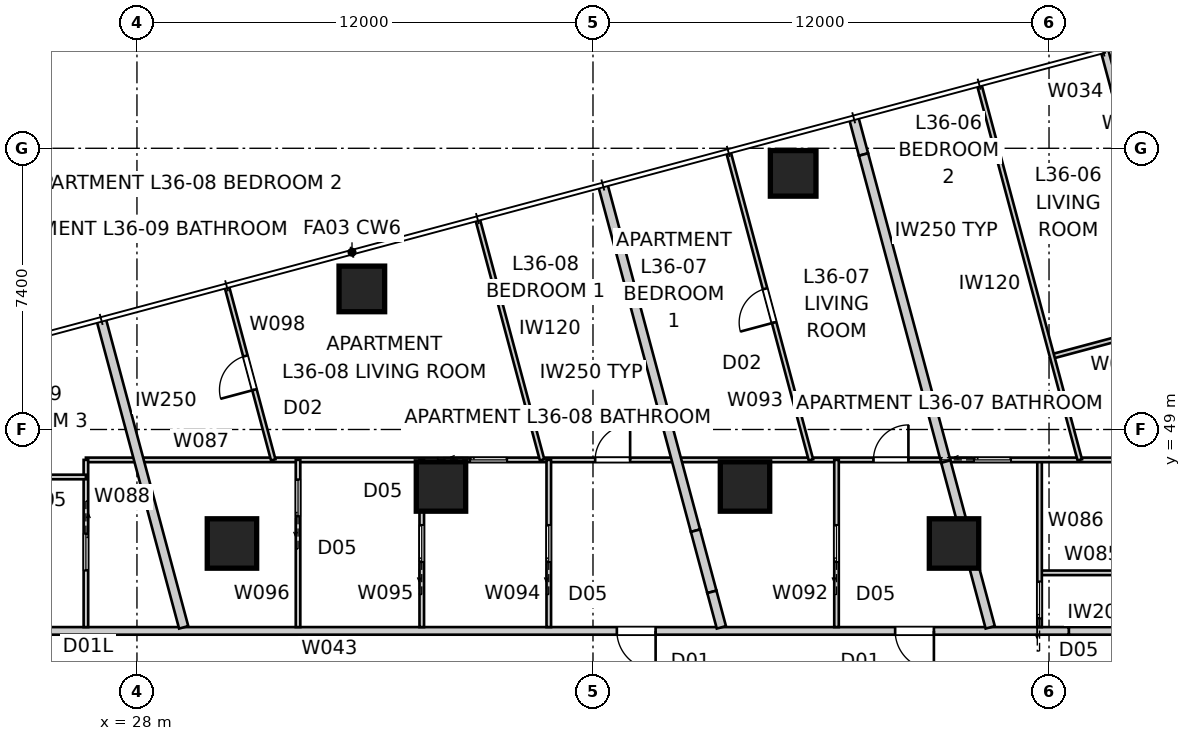
"""IFC4 building model, lengths in metres.
Left out: names, types, materials, properties, quantities, classifications, styles, units other than length and angle.
Written with IfcOpenShell. Run it as: python <this file> out.ifc"""

import sys

from ifc_helpers import new_model, si_unit, direction, frame, frame_2d, origin, origin_2d, place, context, subcontext, project, spatial, rectangle, extrude, element, fill, save


model = new_model("IFC4")
c1 = context("Model", 3, precision=1e-05, world=origin(), true_north=direction((0.0, 1.0)))
c2 = subcontext(c1, "Body", "Model", "MODEL_VIEW")
j1 = project(units=[si_unit("LENGTHUNIT", "METRE"), si_unit("PLANEANGLEUNIT", "RADIAN")], contexts=[c1])
p1 = place(None, origin())
s1 = spatial("IfcSite", under=j1, at=p1, CompositionType="ELEMENT")
p2 = place(p1, origin())
s2 = spatial("IfcBuilding", under=s1, at=p2, CompositionType="ELEMENT")
p3 = place(p2, frame((0.0, 0.0, 132.0)))
s3 = spatial("IfcBuildingStorey", under=s2, at=p3, CompositionType="ELEMENT", Elevation=132.0)
for number, where, z_axis, x_axis in (
    (1, (45.267, 55.74, 0.0), (0.0, 0.0, 1.0), (1.0, 0.0, 0.0)),
    (2, (33.918, 52.699, 0.0), (0.0, 0.0, 1.0), (1.0, 0.0, 0.0)),
):
    element("IfcColumn", number, at=place(p3, frame(where, z_axis=z_axis, x_axis=x_axis)), inside=s3, PredefinedType="COLUMN", context=c2, shape_type="SweptSolid", body=[
        extrude(rectangle(XDim=1.2, YDim=1.2, at=origin_2d()), origin(), (0.0, 0.0, 1.0), 3.4),
    ])
for number, where, z_axis, x_axis in (
    (3, (49.5, 46.0, 0.0), (0.0, 0.0, 1.0), (1.0, 0.0, 0.0)),
    (4, (44.0, 47.5, 0.0), (0.0, 0.0, 1.0), (1.0, 0.0, 0.0)),
    (5, (36.0, 47.5, 0.0), (0.0, 0.0, 1.0), (1.0, 0.0, 0.0)),
    (6, (30.5, 46.0, 0.0), (0.0, 0.0, 1.0), (1.0, 0.0, 0.0)),
):
    element("IfcColumn", number, at=place(p3, frame(where, z_axis=z_axis, x_axis=x_axis)), inside=s3, PredefinedType="COLUMN", context=c2, shape_type="SweptSolid", body=[
        extrude(rectangle(XDim=1.3, YDim=1.3, at=origin_2d()), origin(), (0.0, 0.0, 1.0), 3.4),
    ])
p4 = place(p3, frame((54.496, 55.107, 0.0), z_axis=(0.0, 0.0, 1.0), x_axis=(-0.258786931944, 0.965934430412, 0.0)))
e7 = element("IfcWall", 7, at=p4, inside=s3, PredefinedType="SOLIDWALL", context=c2, shape_type="SweptSolid", body=[
    extrude(rectangle(XDim=4.0, YDim=0.2, at=frame_2d((2.0, 0.0))), origin(), (0.0, 0.0, 1.0), 3.25),
])
p5 = place(p4, frame((1.0, 0.0, 0.45)))
e8 = element("IfcOpeningElement", 8, at=p5, cuts=e7, PredefinedType="OPENING", context=c2, shape_type="SweptSolid", body=[
    extrude(rectangle(XDim=2.0, YDim=1.8, at=frame_2d((1.0, 0.9))), frame((0.0, 0.11, 0.0), z_axis=(0.0, -1.0, 0.0), x_axis=(1.0, 0.0, 0.0)), (0.0, 0.0, 1.0), 0.22),
])
p6 = place(p3, frame((54.074, 43.7, 0.0), z_axis=(0.0, 0.0, 1.0), x_axis=(-1.0, 0.0, 0.0)))
e9 = element("IfcWall", 9, at=p6, inside=s3, PredefinedType="PARTITIONING", context=c2, shape_type="SweptSolid", body=[
    extrude(rectangle(XDim=1.554, YDim=0.2, at=frame_2d((0.777, 0.0))), origin(), (0.0, 0.0, 1.0), 2.721),
])
p7 = place(p3, frame((52.52, 43.7, 0.0), z_axis=(0.0, 0.0, 1.0), x_axis=(-1.0, 0.0, 0.0)))
e10 = element("IfcWall", 10, at=p7, inside=s3, PredefinedType="PARTITIONING", context=c2, shape_type="SweptSolid", body=[
    extrude(rectangle(XDim=27.02, YDim=0.2, at=frame_2d((13.51, 0.0))), origin(), (0.0, 0.0, 1.0), 3.25),
])
p8 = place(p7, frame((10.872, 0.0, 0.0)))
e11 = element("IfcOpeningElement", 11, at=p8, cuts=e10, PredefinedType="OPENING", context=c2, shape_type="SweptSolid", body=[
    extrude(rectangle(XDim=1.02, YDim=2.34, at=frame_2d((0.51, 1.17))), frame((0.0, 0.11, 0.0), z_axis=(0.0, -1.0, 0.0), x_axis=(1.0, 0.0, 0.0)), (0.0, 0.0, 1.0), 0.22),
])
p9 = place(p7, frame((3.549, 0.0, 0.0)))
e12 = element("IfcOpeningElement", 12, at=p9, cuts=e10, PredefinedType="OPENING", context=c2, shape_type="SweptSolid", body=[
    extrude(rectangle(XDim=1.02, YDim=2.34, at=frame_2d((0.51, 1.17))), frame((0.0, 0.11, 0.0), z_axis=(0.0, -1.0, 0.0), x_axis=(1.0, 0.0, 0.0)), (0.0, 0.0, 1.0), 0.22),
])
p10 = place(p3, frame((40.26, 55.434, 0.0), z_axis=(0.0, 0.0, 1.0), x_axis=(0.258812973453, -0.965927453162, 0.0)))
e13 = element("IfcWall", 13, at=p10, inside=s3, PredefinedType="PARTITIONING", context=c2, shape_type="SweptSolid", body=[
    extrude(rectangle(XDim=9.417, YDim=0.25, at=frame_2d((4.708, 0.0))), origin(), (0.0, 0.0, 1.0), 3.25),
])
p11 = place(p3, frame((42.697, 46.338, 0.0), z_axis=(0.0, 0.0, 1.0), x_axis=(0.258765365057, -0.965940208215, 0.0)))
e14 = element("IfcWall", 14, at=p11, inside=s3, PredefinedType="PARTITIONING", context=c2, shape_type="SweptSolid", body=[
    extrude(rectangle(XDim=1.667, YDim=0.25, at=frame_2d((0.833, 0.0))), origin(), (0.0, 0.0, 1.0), 2.796),
])
p12 = place(p3, frame((43.128, 44.727, 0.0), z_axis=(0.0, 0.0, 1.0), x_axis=(0.258904424314, -0.965902944954, 0.0)))
e15 = element("IfcWall", 15, at=p12, inside=s3, PredefinedType="PARTITIONING", context=c2, shape_type="SweptSolid", body=[
    extrude(rectangle(XDim=0.967, YDim=0.25, at=frame_2d((0.483, 0.0))), origin(), (0.0, 0.0, 1.0), 3.25),
])
p13 = place(p3, frame((27.058, 51.896, 0.0), z_axis=(0.0, 0.0, 1.0), x_axis=(0.258819975199, -0.96592557707, 0.0)))
e16 = element("IfcWall", 16, at=p13, inside=s3, PredefinedType="PARTITIONING", context=c2, shape_type="SweptSolid", body=[
    extrude(rectangle(XDim=8.389, YDim=0.25, at=frame_2d((4.194, 0.0))), origin(), (0.0, 0.0, 1.0), 3.25),
])
p14 = place(p3, frame((46.86, 57.202, 0.0), z_axis=(0.0, 0.0, 1.0), x_axis=(0.258817449225, -0.965926253902, 0.0)))
e17 = element("IfcWall", 17, at=p14, inside=s3, PredefinedType="PARTITIONING", context=c2, shape_type="SweptSolid", body=[
    extrude(rectangle(XDim=1.0, YDim=0.25, at=frame_2d((0.5, 0.0))), origin(), (0.0, 0.0, 1.0), 3.25),
])
p15 = place(p3, frame((47.119, 56.237, 0.0), z_axis=(0.0, 0.0, 1.0), x_axis=(0.258823120582, -0.965924734258, 0.0)))
e18 = element("IfcWall", 18, at=p15, inside=s3, PredefinedType="PARTITIONING", context=c2, shape_type="SweptSolid", body=[
    extrude(rectangle(XDim=8.366, YDim=0.25, at=frame_2d((4.183, 0.0))), origin(), (0.0, 0.0, 1.0), 2.721),
])
p16 = place(p3, frame((49.284, 48.156, 0.0), z_axis=(0.0, 0.0, 1.0), x_axis=(0.258846876801, -0.965918368378, 0.0)))
e19 = element("IfcWall", 19, at=p16, inside=s3, PredefinedType="PARTITIONING", context=c2, shape_type="SweptSolid", body=[
    extrude(rectangle(XDim=4.516, YDim=0.25, at=frame_2d((2.258, 0.0))), origin(), (0.0, 0.0, 1.0), 3.25),
])
p17 = place(p3, frame((51.751, 45.228, 0.0), z_axis=(0.0, 0.0, 1.0), x_axis=(1.0, 0.0, 0.0)))
e20 = element("IfcWall", 20, at=p17, inside=s3, PredefinedType="PARTITIONING", context=c2, shape_type="SweptSolid", body=[
    extrude(rectangle(XDim=6.449, YDim=0.12, at=frame_2d((3.225, 0.0))), origin(), (0.0, 0.0, 1.0), 3.25),
])
p18 = place(p17, frame((2.764, 0.0, 0.0)))
e21 = element("IfcOpeningElement", 21, at=p18, cuts=e20, PredefinedType="OPENING", context=c2, shape_type="SweptSolid", body=[
    extrude(rectangle(XDim=0.92, YDim=2.34, at=frame_2d((0.46, 1.17))), frame((0.0, 0.07, 0.0), z_axis=(0.0, -1.0, 0.0), x_axis=(1.0, 0.0, 0.0)), (0.0, 0.0, 1.0), 0.14),
])
p19 = place(p3, frame((51.751, 43.8, 0.0), z_axis=(0.0, 0.0, 1.0), x_axis=(0.0, 1.0, 0.0)))
e22 = element("IfcWall", 22, at=p19, inside=s3, PredefinedType="PARTITIONING", context=c2, shape_type="SweptSolid", body=[
    extrude(rectangle(XDim=4.4, YDim=0.12, at=frame_2d((2.2, 0.0))), origin(), (0.0, 0.0, 1.0), 3.25),
])
p20 = place(p19, frame((0.234, 0.0, 0.0)))
e23 = element("IfcOpeningElement", 23, at=p20, cuts=e22, PredefinedType="OPENING", context=c2, shape_type="SweptSolid", body=[
    extrude(rectangle(XDim=0.96, YDim=2.1, at=frame_2d((0.48, 1.05))), frame((0.0, 0.07, 0.0), z_axis=(0.0, -1.0, 0.0), x_axis=(1.0, 0.0, 0.0)), (0.0, 0.0, 1.0), 0.14),
])
p21 = place(p3, frame((26.657, 48.2, 0.0), z_axis=(0.0, 0.0, 1.0), x_axis=(1.0, 0.0, 0.0)))
e24 = element("IfcWall", 24, at=p21, inside=s3, PredefinedType="PARTITIONING", context=c2, shape_type="SweptSolid", body=[
    extrude(rectangle(XDim=31.543, YDim=0.12, at=frame_2d((15.771, 0.0))), origin(), (0.0, 0.0, 1.0), 2.637),
])
p22 = place(p21, frame((13.4, 0.0, 0.0)))
e25 = element("IfcOpeningElement", 25, at=p22, cuts=e24, PredefinedType="OPENING", context=c2, shape_type="SweptSolid", body=[
    extrude(rectangle(XDim=0.92, YDim=2.34, at=frame_2d((0.46, 1.17))), frame((0.0, 0.07, 0.0), z_axis=(0.0, -1.0, 0.0), x_axis=(1.0, 0.0, 0.0)), (0.0, 0.0, 1.0), 0.14),
])
p23 = place(p21, frame((20.723, 0.0, 0.0)))
e26 = element("IfcOpeningElement", 26, at=p23, cuts=e24, PredefinedType="OPENING", context=c2, shape_type="SweptSolid", body=[
    extrude(rectangle(XDim=0.92, YDim=2.34, at=frame_2d((0.46, 1.17))), frame((0.0, 0.07, 0.0), z_axis=(0.0, -1.0, 0.0), x_axis=(1.0, 0.0, 0.0)), (0.0, 0.0, 1.0), 0.14),
])
p24 = place(p21, frame((10.117, 0.0, 0.0)))
e27 = element("IfcOpeningElement", 27, at=p24, cuts=e24, PredefinedType="OPENING", context=c2, shape_type="SweptSolid", body=[
    extrude(rectangle(XDim=0.96, YDim=2.1, at=frame_2d((0.48, 1.05))), frame((0.0, 0.07, 0.0), z_axis=(0.0, -1.0, 0.0), x_axis=(1.0, 0.0, 0.0)), (0.0, 0.0, 1.0), 0.14),
])
p25 = place(p21, frame((28.362, 0.0, 0.0)))
e28 = element("IfcOpeningElement", 28, at=p25, cuts=e24, PredefinedType="OPENING", context=c2, shape_type="SweptSolid", body=[
    extrude(rectangle(XDim=0.92, YDim=2.34, at=frame_2d((0.46, 1.17))), frame((0.0, 0.07, 0.0), z_axis=(0.0, -1.0, 0.0), x_axis=(1.0, 0.0, 0.0)), (0.0, 0.0, 1.0), 0.14),
])
p26 = place(p21, frame((23.375, 0.0, 0.0)))
e29 = element("IfcOpeningElement", 29, at=p26, cuts=e24, PredefinedType="OPENING", context=c2, shape_type="SweptSolid", body=[
    extrude(rectangle(XDim=0.96, YDim=2.1, at=frame_2d((0.48, 1.05))), frame((0.0, 0.07, 0.0), z_axis=(0.0, -1.0, 0.0), x_axis=(1.0, 0.0, 0.0)), (0.0, 0.0, 1.0), 0.14),
])
p27 = place(p3, frame((59.205, 52.832, 0.0), z_axis=(0.0, 0.0, 1.0), x_axis=(-0.965926630377, -0.258816044185, 0.0)))
e30 = element("IfcWall", 30, at=p27, inside=s3, PredefinedType="PARTITIONING", context=c2, shape_type="SweptSolid", body=[
    extrude(rectangle(XDim=7.377, YDim=0.12, at=frame_2d((3.688, 0.0))), origin(), (0.0, 0.0, 1.0), 3.25),
])
p28 = place(p27, frame((3.208, 0.0, 0.0)))
e31 = element("IfcOpeningElement", 31, at=p28, cuts=e30, PredefinedType="OPENING", context=c2, shape_type="SweptSolid", body=[
    extrude(rectangle(XDim=0.92, YDim=2.34, at=frame_2d((0.46, 1.17))), frame((0.0, 0.07, 0.0), z_axis=(0.0, -1.0, 0.0), x_axis=(1.0, 0.0, 0.0)), (0.0, 0.0, 1.0), 0.14),
])
p29 = place(p3, frame((52.809, 48.2, 0.0), z_axis=(0.0, 0.0, 1.0), x_axis=(-0.258829444594, 0.965923039694, 0.0)))
e32 = element("IfcWall", 32, at=p29, inside=s3, PredefinedType="PARTITIONING", context=c2, shape_type="SweptSolid", body=[
    extrude(rectangle(XDim=10.196, YDim=0.12, at=frame_2d((5.098, 0.0))), origin(), (0.0, 0.0, 1.0), 3.25),
])
p30 = place(p3, frame((46.408, 43.8, 0.0), z_axis=(0.0, 0.0, 1.0), x_axis=(0.0, 1.0, 0.0)))
e33 = element("IfcWall", 33, at=p30, inside=s3, PredefinedType="PARTITIONING", context=c2, shape_type="SweptSolid", body=[
    extrude(rectangle(XDim=4.4, YDim=0.12, at=frame_2d((2.2, 0.0))), origin(), (0.0, 0.0, 1.0), 3.25),
])
p31 = place(p30, frame((1.72, 0.0, 0.0)))
e34 = element("IfcOpeningElement", 34, at=p31, cuts=e33, PredefinedType="OPENING", context=c2, shape_type="SweptSolid", body=[
    extrude(rectangle(XDim=0.96, YDim=2.1, at=frame_2d((0.48, 1.05))), frame((0.0, 0.07, 0.0), z_axis=(0.0, -1.0, 0.0), x_axis=(1.0, 0.0, 0.0)), (0.0, 0.0, 1.0), 0.14),
])
p32 = place(p3, frame((45.735, 48.2, 0.0), z_axis=(0.0, 0.0, 1.0), x_axis=(-0.258805140981, 0.96592955178, 0.0)))
e35 = element("IfcWall", 35, at=p32, inside=s3, PredefinedType="PARTITIONING", context=c2, shape_type="SweptSolid", body=[
    extrude(rectangle(XDim=8.365, YDim=0.12, at=frame_2d((4.182, 0.0))), origin(), (0.0, 0.0, 1.0), 3.25),
])
p33 = place(p32, frame((3.742, 0.0, 0.0)))
e36 = element("IfcOpeningElement", 36, at=p33, cuts=e35, PredefinedType="OPENING", context=c2, shape_type="SweptSolid", body=[
    extrude(rectangle(XDim=0.92, YDim=2.34, at=frame_2d((0.46, 1.17))), frame((0.0, 0.07, 0.0), z_axis=(0.0, -1.0, 0.0), x_axis=(1.0, 0.0, 0.0)), (0.0, 0.0, 1.0), 0.14),
])
p34 = place(p3, frame((38.837, 43.8, 0.0), z_axis=(0.0, 0.0, 1.0), x_axis=(0.0, 1.0, 0.0)))
e37 = element("IfcWall", 37, at=p34, inside=s3, PredefinedType="PARTITIONING", context=c2, shape_type="SweptSolid", body=[
    extrude(rectangle(XDim=4.4, YDim=0.12, at=frame_2d((2.2, 0.0))), origin(), (0.0, 0.0, 1.0), 3.25),
])
p35 = place(p34, frame((1.72, 0.0, 0.0)))
e38 = element("IfcOpeningElement", 38, at=p35, cuts=e37, PredefinedType="OPENING", context=c2, shape_type="SweptSolid", body=[
    extrude(rectangle(XDim=0.96, YDim=2.1, at=frame_2d((0.48, 1.05))), frame((0.0, 0.07, 0.0), z_axis=(0.0, -1.0, 0.0), x_axis=(1.0, 0.0, 0.0)), (0.0, 0.0, 1.0), 0.14),
])
p36 = place(p3, frame((35.494, 43.8, 0.0), z_axis=(0.0, 0.0, 1.0), x_axis=(0.0, 1.0, 0.0)))
e39 = element("IfcWall", 39, at=p36, inside=s3, PredefinedType="PARTITIONING", context=c2, shape_type="SweptSolid", body=[
    extrude(rectangle(XDim=4.4, YDim=0.12, at=frame_2d((2.2, 0.0))), origin(), (0.0, 0.0, 1.0), 3.25),
])
p37 = place(p36, frame((1.72, 0.0, 0.0)))
e40 = element("IfcOpeningElement", 40, at=p37, cuts=e39, PredefinedType="OPENING", context=c2, shape_type="SweptSolid", body=[
    extrude(rectangle(XDim=0.96, YDim=2.1, at=frame_2d((0.48, 1.05))), frame((0.0, 0.07, 0.0), z_axis=(0.0, -1.0, 0.0), x_axis=(1.0, 0.0, 0.0)), (0.0, 0.0, 1.0), 0.14),
])
p38 = place(p3, frame((32.239, 43.8, 0.0), z_axis=(0.0, 0.0, 1.0), x_axis=(0.0, 1.0, 0.0)))
e41 = element("IfcWall", 41, at=p38, inside=s3, PredefinedType="PARTITIONING", context=c2, shape_type="SweptSolid", body=[
    extrude(rectangle(XDim=4.4, YDim=0.12, at=frame_2d((2.2, 0.0))), origin(), (0.0, 0.0, 1.0), 3.25),
])
p39 = place(p38, frame((2.92, 0.0, 0.0)))
e42 = element("IfcOpeningElement", 42, at=p39, cuts=e41, PredefinedType="OPENING", context=c2, shape_type="SweptSolid", body=[
    extrude(rectangle(XDim=0.96, YDim=2.1, at=frame_2d((0.48, 1.05))), frame((0.0, 0.07, 0.0), z_axis=(0.0, -1.0, 0.0), x_axis=(1.0, 0.0, 0.0)), (0.0, 0.0, 1.0), 0.14),
])
p40 = place(p3, frame((36.969, 54.511, 0.0), z_axis=(0.0, 0.0, 1.0), x_axis=(0.258846285554, -0.96591852682, 0.0)))
e43 = element("IfcWall", 43, at=p40, inside=s3, PredefinedType="PARTITIONING", context=c2, shape_type="SweptSolid", body=[
    extrude(rectangle(XDim=6.533, YDim=0.12, at=frame_2d((3.267, 0.0))), origin(), (0.0, 0.0, 1.0), 3.25),
])
p41 = place(p3, frame((31.586, 48.2, 0.0), z_axis=(0.0, 0.0, 1.0), x_axis=(-0.258809612631, 0.965928353663, 0.0)))
e44 = element("IfcWall", 44, at=p41, inside=s3, PredefinedType="PARTITIONING", context=c2, shape_type="SweptSolid", body=[
    extrude(rectangle(XDim=4.702, YDim=0.12, at=frame_2d((2.351, 0.0))), origin(), (0.0, 0.0, 1.0), 3.25),
])
p42 = place(p41, frame((1.911, 0.0, 0.0)))
e45 = element("IfcOpeningElement", 45, at=p42, cuts=e44, PredefinedType="OPENING", context=c2, shape_type="SweptSolid", body=[
    extrude(rectangle(XDim=0.92, YDim=2.34, at=frame_2d((0.46, 1.17))), frame((0.0, 0.07, 0.0), z_axis=(0.0, -1.0, 0.0), x_axis=(1.0, 0.0, 0.0)), (0.0, 0.0, 1.0), 0.14),
])
p43 = place(p3, frame((21.8, 47.75, 0.0), z_axis=(0.0, 0.0, 1.0), x_axis=(1.0, 0.0, 0.0)))
e46 = element("IfcWall", 46, at=p43, inside=s3, PredefinedType="PARTITIONING", context=c2, shape_type="SweptSolid", body=[
    extrude(rectangle(XDim=4.857, YDim=0.12, at=frame_2d((2.428, 0.0))), origin(), (0.0, 0.0, 1.0), 3.25),
])
p44 = place(p43, frame((1.969, 0.0, 0.0)))
e47 = element("IfcOpeningElement", 47, at=p44, cuts=e46, PredefinedType="OPENING", context=c2, shape_type="SweptSolid", body=[
    extrude(rectangle(XDim=0.92, YDim=2.34, at=frame_2d((0.46, 1.17))), frame((0.0, 0.07, 0.0), z_axis=(0.0, -1.0, 0.0), x_axis=(1.0, 0.0, 0.0)), (0.0, 0.0, 1.0), 0.14),
])
p45 = place(p3, frame((26.657, 48.2, 0.0), z_axis=(0.0, 0.0, 1.0), x_axis=(0.0, -1.0, 0.0)))
e48 = element("IfcWall", 48, at=p45, inside=s3, PredefinedType="PARTITIONING", context=c2, shape_type="SweptSolid", body=[
    extrude(rectangle(XDim=4.4, YDim=0.12, at=frame_2d((2.2, 0.0))), origin(), (0.0, 0.0, 1.0), 3.25),
])
p46 = place(p45, frame((1.945, 0.0, 0.0)))
e49 = element("IfcOpeningElement", 49, at=p46, cuts=e48, PredefinedType="OPENING", context=c2, shape_type="SweptSolid", body=[
    extrude(rectangle(XDim=0.96, YDim=2.1, at=frame_2d((0.48, 1.05))), frame((0.0, 0.07, 0.0), z_axis=(0.0, -1.0, 0.0), x_axis=(1.0, 0.0, 0.0)), (0.0, 0.0, 1.0), 0.14),
])
p47 = place(p8, origin())
e50 = element("IfcDoor", 50, at=p47, inside=s3, OperationType="SINGLE_SWING_LEFT", PredefinedType="DOOR", context=c2, shape_type="SweptSolid", body=[
    extrude(rectangle(XDim=1.02, YDim=2.34, at=frame_2d((0.51, 1.17))), frame((0.0, 0.025, 0.0), z_axis=(0.0, -1.0, 0.0), x_axis=(1.0, 0.0, 0.0)), (0.0, 0.0, 1.0), 0.05),
])
fill(e11, e50)
p48 = place(p9, origin())
e51 = element("IfcDoor", 51, at=p48, inside=s3, OperationType="SINGLE_SWING_LEFT", PredefinedType="DOOR", context=c2, shape_type="SweptSolid", body=[
    extrude(rectangle(XDim=1.02, YDim=2.34, at=frame_2d((0.51, 1.17))), frame((0.0, 0.025, 0.0), z_axis=(0.0, -1.0, 0.0), x_axis=(1.0, 0.0, 0.0)), (0.0, 0.0, 1.0), 0.05),
])
fill(e12, e51)
p49 = place(p35, origin())
e52 = element("IfcDoor", 52, at=p49, inside=s3, OperationType="SLIDING_TO_LEFT", PredefinedType="DOOR", context=c2, shape_type="SweptSolid", body=[
    extrude(rectangle(XDim=0.96, YDim=2.1, at=frame_2d((0.48, 1.05))), frame((0.0, 0.025, 0.0), z_axis=(0.0, -1.0, 0.0), x_axis=(1.0, 0.0, 0.0)), (0.0, 0.0, 1.0), 0.05),
])
fill(e38, e52)
p50 = place(p22, origin())
e53 = element("IfcDoor", 53, at=p50, inside=s3, OperationType="SINGLE_SWING_RIGHT", PredefinedType="DOOR", context=c2, shape_type="SweptSolid", body=[
    extrude(rectangle(XDim=0.92, YDim=2.34, at=frame_2d((0.46, 1.17))), frame((0.0, 0.025, 0.0), z_axis=(0.0, -1.0, 0.0), x_axis=(1.0, 0.0, 0.0)), (0.0, 0.0, 1.0), 0.05),
])
fill(e25, e53)
p51 = place(p31, origin())
e54 = element("IfcDoor", 54, at=p51, inside=s3, OperationType="SLIDING_TO_LEFT", PredefinedType="DOOR", context=c2, shape_type="SweptSolid", body=[
    extrude(rectangle(XDim=0.96, YDim=2.1, at=frame_2d((0.48, 1.05))), frame((0.0, 0.025, 0.0), z_axis=(0.0, -1.0, 0.0), x_axis=(1.0, 0.0, 0.0)), (0.0, 0.0, 1.0), 0.05),
])
fill(e34, e54)
p52 = place(p23, origin())
e55 = element("IfcDoor", 55, at=p52, inside=s3, OperationType="SINGLE_SWING_RIGHT", PredefinedType="DOOR", context=c2, shape_type="SweptSolid", body=[
    extrude(rectangle(XDim=0.92, YDim=2.34, at=frame_2d((0.46, 1.17))), frame((0.0, 0.025, 0.0), z_axis=(0.0, -1.0, 0.0), x_axis=(1.0, 0.0, 0.0)), (0.0, 0.0, 1.0), 0.05),
])
fill(e26, e55)
p53 = place(p46, origin())
e56 = element("IfcDoor", 56, at=p53, inside=s3, OperationType="SLIDING_TO_LEFT", PredefinedType="DOOR", context=c2, shape_type="SweptSolid", body=[
    extrude(rectangle(XDim=0.96, YDim=2.1, at=frame_2d((0.48, 1.05))), frame((0.0, 0.025, 0.0), z_axis=(0.0, -1.0, 0.0), x_axis=(1.0, 0.0, 0.0)), (0.0, 0.0, 1.0), 0.05),
])
fill(e49, e56)
p54 = place(p20, origin())
e57 = element("IfcDoor", 57, at=p54, inside=s3, OperationType="SLIDING_TO_LEFT", PredefinedType="DOOR", context=c2, shape_type="SweptSolid", body=[
    extrude(rectangle(XDim=0.96, YDim=2.1, at=frame_2d((0.48, 1.05))), frame((0.0, 0.025, 0.0), z_axis=(0.0, -1.0, 0.0), x_axis=(1.0, 0.0, 0.0)), (0.0, 0.0, 1.0), 0.05),
])
fill(e23, e57)
p55 = place(p37, origin())
e58 = element("IfcDoor", 58, at=p55, inside=s3, OperationType="SLIDING_TO_LEFT", PredefinedType="DOOR", context=c2, shape_type="SweptSolid", body=[
    extrude(rectangle(XDim=0.96, YDim=2.1, at=frame_2d((0.48, 1.05))), frame((0.0, 0.025, 0.0), z_axis=(0.0, -1.0, 0.0), x_axis=(1.0, 0.0, 0.0)), (0.0, 0.0, 1.0), 0.05),
])
fill(e40, e58)
p56 = place(p24, origin())
e59 = element("IfcDoor", 59, at=p56, inside=s3, OperationType="SLIDING_TO_LEFT", PredefinedType="DOOR", context=c2, shape_type="SweptSolid", body=[
    extrude(rectangle(XDim=0.96, YDim=2.1, at=frame_2d((0.48, 1.05))), frame((0.0, 0.025, 0.0), z_axis=(0.0, -1.0, 0.0), x_axis=(1.0, 0.0, 0.0)), (0.0, 0.0, 1.0), 0.05),
])
fill(e27, e59)
p57 = place(p33, origin())
e60 = element("IfcDoor", 60, at=p57, inside=s3, OperationType="SINGLE_SWING_LEFT", PredefinedType="DOOR", context=c2, shape_type="SweptSolid", body=[
    extrude(rectangle(XDim=0.92, YDim=2.34, at=frame_2d((0.46, 1.17))), frame((0.0, 0.025, 0.0), z_axis=(0.0, -1.0, 0.0), x_axis=(1.0, 0.0, 0.0)), (0.0, 0.0, 1.0), 0.05),
])
fill(e36, e60)
p58 = place(p26, origin())
e61 = element("IfcDoor", 61, at=p58, inside=s3, OperationType="SLIDING_TO_LEFT", PredefinedType="DOOR", context=c2, shape_type="SweptSolid", body=[
    extrude(rectangle(XDim=0.96, YDim=2.1, at=frame_2d((0.48, 1.05))), frame((0.0, 0.025, 0.0), z_axis=(0.0, -1.0, 0.0), x_axis=(1.0, 0.0, 0.0)), (0.0, 0.0, 1.0), 0.05),
])
fill(e29, e61)
p59 = place(p39, origin())
e62 = element("IfcDoor", 62, at=p59, inside=s3, OperationType="SLIDING_TO_LEFT", PredefinedType="DOOR", context=c2, shape_type="SweptSolid", body=[
    extrude(rectangle(XDim=0.96, YDim=2.1, at=frame_2d((0.48, 1.05))), frame((0.0, 0.025, 0.0), z_axis=(0.0, -1.0, 0.0), x_axis=(1.0, 0.0, 0.0)), (0.0, 0.0, 1.0), 0.05),
])
fill(e42, e62)
p60 = place(p42, origin())
e63 = element("IfcDoor", 63, at=p60, inside=s3, OperationType="SINGLE_SWING_LEFT", PredefinedType="DOOR", context=c2, shape_type="SweptSolid", body=[
    extrude(rectangle(XDim=0.92, YDim=2.34, at=frame_2d((0.46, 1.17))), frame((0.0, 0.025, 0.0), z_axis=(0.0, -1.0, 0.0), x_axis=(1.0, 0.0, 0.0)), (0.0, 0.0, 1.0), 0.05),
])
fill(e45, e63)
save(model, sys.argv[1])
